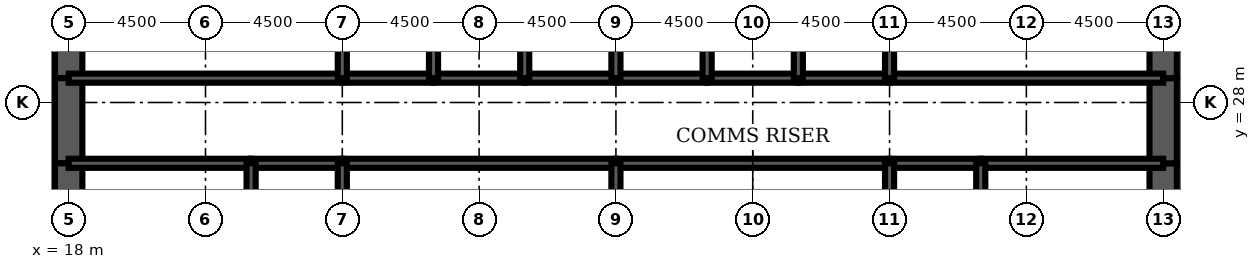
"""IFC4 building model, lengths in metres.
Left out: names, types, materials, properties, quantities, classifications, styles, units other than length and angle.
Written with IfcOpenShell. Run it as: python <this file> out.ifc"""

import sys

from ifc_helpers import new_model, si_unit, direction, frame, frame_2d, origin, place, context, subcontext, project, spatial, rectangle, extrude, element, fill, save


model = new_model("IFC4")
c1 = context("Model", 3, precision=1e-05, world=origin(), true_north=direction((0.0, 1.0)))
c2 = subcontext(c1, "Body", "Model", "MODEL_VIEW")
j1 = project(units=[si_unit("LENGTHUNIT", "METRE"), si_unit("PLANEANGLEUNIT", "RADIAN")], contexts=[c1])
p1 = place(None, origin())
s1 = spatial("IfcSite", under=j1, at=p1, CompositionType="ELEMENT")
p2 = place(p1, origin())
s2 = spatial("IfcBuilding", under=s1, at=p2, CompositionType="ELEMENT")
p3 = place(p2, frame((0.0, 0.0, 146.7)))
s3 = spatial("IfcBuildingStorey", under=s2, at=p3, CompositionType="ELEMENT", Elevation=146.7)
p4 = place(p3, frame((18.0, 32.0, 0.0), z_axis=(0.0, 0.0, 1.0), x_axis=(0.0, -1.0, 0.0)))
e1 = element("IfcWall", 1, at=p4, inside=s3, PredefinedType="SHEAR", context=c2, shape_type="SweptSolid", body=[
    extrude(rectangle(XDim=3.2, YDim=0.9, at=frame_2d((1.6, 0.0))), origin(), (0.0, 0.0, 1.0), 4.2),
])
p5 = place(p3, frame((18.0, 28.8, 0.0), z_axis=(0.0, 0.0, 1.0), x_axis=(0.0, -1.0, 0.0)))
e2 = element("IfcWall", 2, at=p5, inside=s3, PredefinedType="SHEAR", context=c2, shape_type="SweptSolid", body=[
    extrude(rectangle(XDim=2.8, YDim=0.9, at=frame_2d((1.4, 0.0))), origin(), (0.0, 0.0, 1.0), 4.2),
])
p6 = place(p5, frame((0.4, 0.0, 0.0)))
e3 = element("IfcOpeningElement", 3, at=p6, cuts=e2, PredefinedType="OPENING", context=c2, shape_type="SweptSolid", body=[
    extrude(rectangle(XDim=1.8, YDim=2.1, at=frame_2d((0.9, 1.05))), frame((0.0, 0.46, 0.0), z_axis=(0.0, -1.0, 0.0), x_axis=(1.0, 0.0, 0.0)), (0.0, 0.0, 1.0), 0.92),
])
for number, where, z_axis, x_axis in (
    (4, (18.0, 26.0, 0.0), (0.0, 0.0, 1.0), (0.0, -1.0, 0.0)),
    (5, (54.0, 22.0, 0.0), (0.0, 0.0, 1.0), (0.0, 1.0, 0.0)),
):
    element("IfcWall", number, at=place(p3, frame(where, z_axis=z_axis, x_axis=x_axis)), inside=s3, PredefinedType="SHEAR", context=c2, shape_type="SweptSolid", body=[
        extrude(rectangle(XDim=4.0, YDim=0.9, at=frame_2d((2.0, 0.0))), origin(), (0.0, 0.0, 1.0), 4.2),
    ])
p7 = place(p3, frame((54.0, 26.0, 0.0), z_axis=(0.0, 0.0, 1.0), x_axis=(0.0, 1.0, 0.0)))
e6 = element("IfcWall", 6, at=p7, inside=s3, PredefinedType="SHEAR", context=c2, shape_type="SweptSolid", body=[
    extrude(rectangle(XDim=2.8, YDim=0.9, at=frame_2d((1.4, 0.0))), origin(), (0.0, 0.0, 1.0), 4.2),
])
p8 = place(p7, frame((0.6, 0.0, 0.0)))
e7 = element("IfcOpeningElement", 7, at=p8, cuts=e6, PredefinedType="OPENING", context=c2, shape_type="SweptSolid", body=[
    extrude(rectangle(XDim=1.8, YDim=2.1, at=frame_2d((0.9, 1.05))), frame((0.0, 0.46, 0.0), z_axis=(0.0, -1.0, 0.0), x_axis=(1.0, 0.0, 0.0)), (0.0, 0.0, 1.0), 0.92),
])
p9 = place(p3, frame((54.0, 28.8, 0.0), z_axis=(0.0, 0.0, 1.0), x_axis=(0.0, 1.0, 0.0)))
e8 = element("IfcWall", 8, at=p9, inside=s3, PredefinedType="SHEAR", context=c2, shape_type="SweptSolid", body=[
    extrude(rectangle(XDim=3.2, YDim=0.9, at=frame_2d((1.6, 0.0))), origin(), (0.0, 0.0, 1.0), 4.2),
])
p10 = place(p3, frame((18.0, 28.8, 0.0), z_axis=(0.0, 0.0, 1.0), x_axis=(1.0, 0.0, 0.0)))
e9 = element("IfcWall", 9, at=p10, inside=s3, PredefinedType="SOLIDWALL", context=c2, shape_type="SweptSolid", body=[
    extrude(rectangle(XDim=9.0, YDim=0.3, at=frame_2d((4.5, 0.0))), origin(), (0.0, 0.0, 1.0), 4.2),
])
p11 = place(p10, frame((0.65, 0.0, 0.0)))
e10 = element("IfcOpeningElement", 10, at=p11, cuts=e9, PredefinedType="OPENING", context=c2, shape_type="SweptSolid", body=[
    extrude(rectangle(XDim=1.0, YDim=2.1, at=frame_2d((0.5, 1.05))), frame((0.0, 0.16, 0.0), z_axis=(0.0, -1.0, 0.0), x_axis=(1.0, 0.0, 0.0)), (0.0, 0.0, 1.0), 0.32),
])
p12 = place(p3, frame((27.0, 28.8, 0.0), z_axis=(0.0, 0.0, 1.0), x_axis=(1.0, 0.0, 0.0)))
e11 = element("IfcWall", 11, at=p12, inside=s3, PredefinedType="SOLIDWALL", context=c2, shape_type="SweptSolid", body=[
    extrude(rectangle(XDim=3.0, YDim=0.3, at=frame_2d((1.5, 0.0))), origin(), (0.0, 0.0, 1.0), 4.2),
])
p13 = place(p12, frame((0.95, 0.0, 0.0)))
e12 = element("IfcOpeningElement", 12, at=p13, cuts=e11, PredefinedType="OPENING", context=c2, shape_type="SweptSolid", body=[
    extrude(rectangle(XDim=1.1, YDim=2.2, at=frame_2d((0.55, 1.1))), frame((0.0, 0.16, 0.0), z_axis=(0.0, -1.0, 0.0), x_axis=(1.0, 0.0, 0.0)), (0.0, 0.0, 1.0), 0.32),
])
p14 = place(p3, frame((30.0, 28.8, 0.0), z_axis=(0.0, 0.0, 1.0), x_axis=(1.0, 0.0, 0.0)))
e13 = element("IfcWall", 13, at=p14, inside=s3, PredefinedType="SOLIDWALL", context=c2, shape_type="SweptSolid", body=[
    extrude(rectangle(XDim=3.0, YDim=0.3, at=frame_2d((1.5, 0.0))), origin(), (0.0, 0.0, 1.0), 4.2),
])
p15 = place(p14, frame((0.95, 0.0, 0.0)))
e14 = element("IfcOpeningElement", 14, at=p15, cuts=e13, PredefinedType="OPENING", context=c2, shape_type="SweptSolid", body=[
    extrude(rectangle(XDim=1.1, YDim=2.2, at=frame_2d((0.55, 1.1))), frame((0.0, 0.16, 0.0), z_axis=(0.0, -1.0, 0.0), x_axis=(1.0, 0.0, 0.0)), (0.0, 0.0, 1.0), 0.32),
])
p16 = place(p3, frame((33.0, 28.8, 0.0), z_axis=(0.0, 0.0, 1.0), x_axis=(1.0, 0.0, 0.0)))
e15 = element("IfcWall", 15, at=p16, inside=s3, PredefinedType="SOLIDWALL", context=c2, shape_type="SweptSolid", body=[
    extrude(rectangle(XDim=3.0, YDim=0.3, at=frame_2d((1.5, 0.0))), origin(), (0.0, 0.0, 1.0), 4.2),
])
p17 = place(p16, frame((0.95, 0.0, 0.0)))
e16 = element("IfcOpeningElement", 16, at=p17, cuts=e15, PredefinedType="OPENING", context=c2, shape_type="SweptSolid", body=[
    extrude(rectangle(XDim=1.1, YDim=2.2, at=frame_2d((0.55, 1.1))), frame((0.0, 0.16, 0.0), z_axis=(0.0, -1.0, 0.0), x_axis=(1.0, 0.0, 0.0)), (0.0, 0.0, 1.0), 0.32),
])
for number, where, z_axis, x_axis in (
    (17, (36.0, 28.8, 0.0), (0.0, 0.0, 1.0), (1.0, 0.0, 0.0)),
    (18, (39.0, 28.8, 0.0), (0.0, 0.0, 1.0), (1.0, 0.0, 0.0)),
):
    element("IfcWall", number, at=place(p3, frame(where, z_axis=z_axis, x_axis=x_axis)), inside=s3, PredefinedType="SOLIDWALL", context=c2, shape_type="SweptSolid", body=[
        extrude(rectangle(XDim=3.0, YDim=0.3, at=frame_2d((1.5, 0.0))), origin(), (0.0, 0.0, 1.0), 4.2),
    ])
p18 = place(p3, frame((42.0, 28.8, 0.0), z_axis=(0.0, 0.0, 1.0), x_axis=(1.0, 0.0, 0.0)))
e19 = element("IfcWall", 19, at=p18, inside=s3, PredefinedType="SOLIDWALL", context=c2, shape_type="SweptSolid", body=[
    extrude(rectangle(XDim=3.0, YDim=0.3, at=frame_2d((1.5, 0.0))), origin(), (0.0, 0.0, 1.0), 4.2),
])
p19 = place(p18, frame((0.95, 0.0, 0.0)))
e20 = element("IfcOpeningElement", 20, at=p19, cuts=e19, PredefinedType="OPENING", context=c2, shape_type="SweptSolid", body=[
    extrude(rectangle(XDim=1.1, YDim=2.2, at=frame_2d((0.55, 1.1))), frame((0.0, 0.16, 0.0), z_axis=(0.0, -1.0, 0.0), x_axis=(1.0, 0.0, 0.0)), (0.0, 0.0, 1.0), 0.32),
])
p20 = place(p3, frame((45.0, 28.8, 0.0), z_axis=(0.0, 0.0, 1.0), x_axis=(1.0, 0.0, 0.0)))
e21 = element("IfcWall", 21, at=p20, inside=s3, PredefinedType="SOLIDWALL", context=c2, shape_type="SweptSolid", body=[
    extrude(rectangle(XDim=9.0, YDim=0.3, at=frame_2d((4.5, 0.0))), origin(), (0.0, 0.0, 1.0), 4.2),
])
p21 = place(p20, frame((7.35, 0.0, 0.0)))
e22 = element("IfcOpeningElement", 22, at=p21, cuts=e21, PredefinedType="OPENING", context=c2, shape_type="SweptSolid", body=[
    extrude(rectangle(XDim=1.0, YDim=2.1, at=frame_2d((0.5, 1.05))), frame((0.0, 0.16, 0.0), z_axis=(0.0, -1.0, 0.0), x_axis=(1.0, 0.0, 0.0)), (0.0, 0.0, 1.0), 0.32),
])
p22 = place(p3, frame((18.0, 26.0, 0.0), z_axis=(0.0, 0.0, 1.0), x_axis=(1.0, 0.0, 0.0)))
e23 = element("IfcWall", 23, at=p22, inside=s3, PredefinedType="SOLIDWALL", context=c2, shape_type="SweptSolid", body=[
    extrude(rectangle(XDim=6.0, YDim=0.3, at=frame_2d((3.0, 0.0))), origin(), (0.0, 0.0, 1.0), 4.2),
])
p23 = place(p3, frame((24.0, 26.0, 0.0), z_axis=(0.0, 0.0, 1.0), x_axis=(1.0, 0.0, 0.0)))
e24 = element("IfcWall", 24, at=p23, inside=s3, PredefinedType="SOLIDWALL", context=c2, shape_type="SweptSolid", body=[
    extrude(rectangle(XDim=3.0, YDim=0.3, at=frame_2d((1.5, 0.0))), origin(), (0.0, 0.0, 1.0), 4.2),
])
for number, where, z_axis, x_axis in (
    (25, (27.0, 26.0, 0.0), (0.0, 0.0, 1.0), (1.0, 0.0, 0.0)),
    (26, (36.0, 26.0, 0.0), (0.0, 0.0, 1.0), (1.0, 0.0, 0.0)),
):
    element("IfcWall", number, at=place(p3, frame(where, z_axis=z_axis, x_axis=x_axis)), inside=s3, PredefinedType="SOLIDWALL", context=c2, shape_type="SweptSolid", body=[
        extrude(rectangle(XDim=9.0, YDim=0.3, at=frame_2d((4.5, 0.0))), origin(), (0.0, 0.0, 1.0), 4.2),
    ])
p24 = place(p3, frame((45.0, 26.0, 0.0), z_axis=(0.0, 0.0, 1.0), x_axis=(1.0, 0.0, 0.0)))
e27 = element("IfcWall", 27, at=p24, inside=s3, PredefinedType="SOLIDWALL", context=c2, shape_type="SweptSolid", body=[
    extrude(rectangle(XDim=3.0, YDim=0.3, at=frame_2d((1.5, 0.0))), origin(), (0.0, 0.0, 1.0), 4.2),
])
p25 = place(p3, frame((48.0, 26.0, 0.0), z_axis=(0.0, 0.0, 1.0), x_axis=(1.0, 0.0, 0.0)))
e28 = element("IfcWall", 28, at=p25, inside=s3, PredefinedType="SOLIDWALL", context=c2, shape_type="SweptSolid", body=[
    extrude(rectangle(XDim=6.0, YDim=0.3, at=frame_2d((3.0, 0.0))), origin(), (0.0, 0.0, 1.0), 4.2),
])
for number, where, z_axis, x_axis in (
    (29, (27.0, 28.8, 0.0), (0.0, 0.0, 1.0), (0.0, 1.0, 0.0)),
    (30, (30.0, 28.8, 0.0), (0.0, 0.0, 1.0), (0.0, 1.0, 0.0)),
    (31, (33.0, 28.8, 0.0), (0.0, 0.0, 1.0), (0.0, 1.0, 0.0)),
    (32, (36.0, 28.8, 0.0), (0.0, 0.0, 1.0), (0.0, 1.0, 0.0)),
    (33, (39.0, 28.8, 0.0), (0.0, 0.0, 1.0), (0.0, 1.0, 0.0)),
    (34, (42.0, 28.8, 0.0), (0.0, 0.0, 1.0), (0.0, 1.0, 0.0)),
    (35, (45.0, 28.8, 0.0), (0.0, 0.0, 1.0), (0.0, 1.0, 0.0)),
):
    element("IfcWall", number, at=place(p3, frame(where, z_axis=z_axis, x_axis=x_axis)), inside=s3, PredefinedType="SOLIDWALL", context=c2, shape_type="SweptSolid", body=[
        extrude(rectangle(XDim=3.2, YDim=0.3, at=frame_2d((1.6, 0.0))), origin(), (0.0, 0.0, 1.0), 4.2),
    ])
for number, where, z_axis, x_axis in (
    (36, (24.0, 22.0, 0.0), (0.0, 0.0, 1.0), (0.0, 1.0, 0.0)),
    (37, (27.0, 22.0, 0.0), (0.0, 0.0, 1.0), (0.0, 1.0, 0.0)),
    (38, (36.0, 22.0, 0.0), (0.0, 0.0, 1.0), (0.0, 1.0, 0.0)),
    (39, (45.0, 22.0, 0.0), (0.0, 0.0, 1.0), (0.0, 1.0, 0.0)),
    (40, (48.0, 22.0, 0.0), (0.0, 0.0, 1.0), (0.0, 1.0, 0.0)),
):
    element("IfcWall", number, at=place(p3, frame(where, z_axis=z_axis, x_axis=x_axis)), inside=s3, PredefinedType="SOLIDWALL", context=c2, shape_type="SweptSolid", body=[
        extrude(rectangle(XDim=4.0, YDim=0.3, at=frame_2d((2.0, 0.0))), origin(), (0.0, 0.0, 1.0), 4.2),
    ])
p26 = place(p3, frame((42.0, 22.15, 0.0), z_axis=(0.0, 0.0, 1.0), x_axis=(0.0, 1.0, 0.0)))
e41 = element("IfcWall", 41, at=p26, inside=s3, PredefinedType="PARTITIONING", context=c2, shape_type="SweptSolid", body=[
    extrude(rectangle(XDim=3.7, YDim=0.15, at=frame_2d((1.85, 0.0))), origin(), (0.0, 0.0, 1.0), 3.0),
])
p27 = place(p26, frame((2.2, 0.0, 0.0)))
e42 = element("IfcOpeningElement", 42, at=p27, cuts=e41, PredefinedType="OPENING", context=c2, shape_type="SweptSolid", body=[
    extrude(rectangle(XDim=1.0, YDim=2.1, at=frame_2d((0.5, 1.05))), frame((0.0, 0.085, 0.0), z_axis=(0.0, -1.0, 0.0), x_axis=(1.0, 0.0, 0.0)), (0.0, 0.0, 1.0), 0.17),
])
p28 = place(p3, frame((20.025, 22.15, 0.0), z_axis=(0.0, 0.0, 1.0), x_axis=(0.0, 1.0, 0.0)))
e43 = element("IfcWall", 43, at=p28, inside=s3, PredefinedType="PARTITIONING", context=c2, shape_type="SweptSolid", body=[
    extrude(rectangle(XDim=3.7, YDim=0.15, at=frame_2d((1.85, 0.0))), origin(), (0.0, 0.0, 1.0), 3.0),
])
p29 = place(p27, origin())
e44 = element("IfcDoor", 44, at=p29, inside=s3, OperationType="SINGLE_SWING_RIGHT", PredefinedType="DOOR", context=c2, shape_type="SweptSolid", body=[
    extrude(rectangle(XDim=1.0, YDim=2.1, at=frame_2d((0.5, 1.05))), frame((0.0, 0.025, 0.0), z_axis=(0.0, -1.0, 0.0), x_axis=(1.0, 0.0, 0.0)), (0.0, 0.0, 1.0), 0.05),
])
fill(e42, e44)
p30 = place(p19, origin())
e45 = element("IfcDoor", 45, at=p30, inside=s3, OperationType="DOUBLE_DOOR_SLIDING", PredefinedType="USERDEFINED", context=c2, shape_type="SweptSolid", body=[
    extrude(rectangle(XDim=1.1, YDim=2.2, at=frame_2d((0.55, 1.1))), frame((0.0, 0.025, 0.0), z_axis=(0.0, -1.0, 0.0), x_axis=(1.0, 0.0, 0.0)), (0.0, 0.0, 1.0), 0.05),
])
fill(e20, e45)
p31 = place(p13, origin())
e46 = element("IfcDoor", 46, at=p31, inside=s3, OperationType="DOUBLE_DOOR_SLIDING", PredefinedType="USERDEFINED", context=c2, shape_type="SweptSolid", body=[
    extrude(rectangle(XDim=1.1, YDim=2.2, at=frame_2d((0.55, 1.1))), frame((0.0, 0.025, 0.0), z_axis=(0.0, -1.0, 0.0), x_axis=(1.0, 0.0, 0.0)), (0.0, 0.0, 1.0), 0.05),
])
fill(e12, e46)
p32 = place(p15, origin())
e47 = element("IfcDoor", 47, at=p32, inside=s3, OperationType="DOUBLE_DOOR_SLIDING", PredefinedType="USERDEFINED", context=c2, shape_type="SweptSolid", body=[
    extrude(rectangle(XDim=1.1, YDim=2.2, at=frame_2d((0.55, 1.1))), frame((0.0, 0.025, 0.0), z_axis=(0.0, -1.0, 0.0), x_axis=(1.0, 0.0, 0.0)), (0.0, 0.0, 1.0), 0.05),
])
fill(e14, e47)
p33 = place(p17, origin())
e48 = element("IfcDoor", 48, at=p33, inside=s3, OperationType="DOUBLE_DOOR_SLIDING", PredefinedType="USERDEFINED", context=c2, shape_type="SweptSolid", body=[
    extrude(rectangle(XDim=1.1, YDim=2.2, at=frame_2d((0.55, 1.1))), frame((0.0, 0.025, 0.0), z_axis=(0.0, -1.0, 0.0), x_axis=(1.0, 0.0, 0.0)), (0.0, 0.0, 1.0), 0.05),
])
fill(e16, e48)
p34 = place(p11, origin())
e49 = element("IfcDoor", 49, at=p34, inside=s3, OperationType="SINGLE_SWING_LEFT", PredefinedType="DOOR", context=c2, shape_type="SweptSolid", body=[
    extrude(rectangle(XDim=1.0, YDim=2.1, at=frame_2d((0.5, 1.05))), frame((0.0, 0.025, 0.0), z_axis=(0.0, -1.0, 0.0), x_axis=(1.0, 0.0, 0.0)), (0.0, 0.0, 1.0), 0.05),
])
fill(e10, e49)
p35 = place(p21, origin())
e50 = element("IfcDoor", 50, at=p35, inside=s3, OperationType="SINGLE_SWING_RIGHT", PredefinedType="DOOR", context=c2, shape_type="SweptSolid", body=[
    extrude(rectangle(XDim=1.0, YDim=2.1, at=frame_2d((0.5, 1.05))), frame((0.0, 0.025, 0.0), z_axis=(0.0, -1.0, 0.0), x_axis=(1.0, 0.0, 0.0)), (0.0, 0.0, 1.0), 0.05),
])
fill(e22, e50)
p36 = place(p6, origin())
e51 = element("IfcDoor", 51, at=p36, inside=s3, OperationType="SINGLE_SWING_LEFT", PredefinedType="DOOR", context=c2, shape_type="SweptSolid", body=[
    extrude(rectangle(XDim=1.8, YDim=2.1, at=frame_2d((0.9, 1.05))), frame((0.0, 0.45, 0.0), z_axis=(0.0, -1.0, 0.0), x_axis=(1.0, 0.0, 0.0)), (0.0, 0.0, 1.0), 0.899),
])
fill(e3, e51)
p37 = place(p8, origin())
e52 = element("IfcDoor", 52, at=p37, inside=s3, OperationType="SINGLE_SWING_LEFT", PredefinedType="DOOR", context=c2, shape_type="SweptSolid", body=[
    extrude(rectangle(XDim=1.8, YDim=2.1, at=frame_2d((0.9, 1.05))), frame((0.0, 0.45, 0.0), z_axis=(0.0, -1.0, 0.0), x_axis=(1.0, 0.0, 0.0)), (0.0, 0.0, 1.0), 0.899),
])
fill(e7, e52)
save(model, sys.argv[1])
